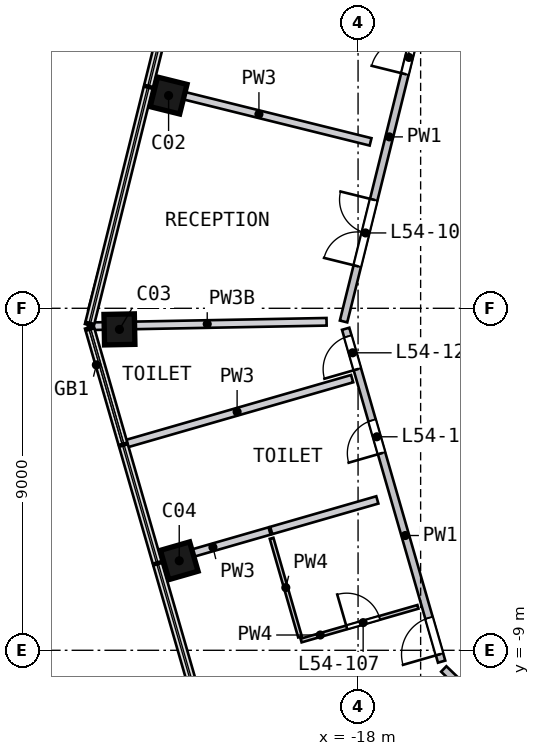
"""IFC4 building model, lengths in metres.
Left out: names, types, materials, properties, quantities, classifications, styles, units other than length and angle.
Written with IfcOpenShell. Run it as: python <this file> out.ifc"""

import sys

from ifc_helpers import new_model, si_unit, direction, frame, frame_2d, origin, origin_2d, place, context, subcontext, project, spatial, rectangle, extrude, element, fill, save


model = new_model("IFC4")
c1 = context("Model", 3, precision=1e-05, world=origin(), true_north=direction((0.0, 1.0)))
c2 = subcontext(c1, "Body", "Model", "MODEL_VIEW")
j1 = project(units=[si_unit("LENGTHUNIT", "METRE"), si_unit("PLANEANGLEUNIT", "RADIAN")], contexts=[c1])
p1 = place(None, origin())
s1 = spatial("IfcSite", under=j1, at=p1, CompositionType="ELEMENT")
p2 = place(p1, origin())
s2 = spatial("IfcBuilding", under=s1, at=p2, CompositionType="ELEMENT")
p3 = place(p2, frame((0.0, 0.0, 222.0)))
s3 = spatial("IfcBuildingStorey", under=s2, at=p3, CompositionType="ELEMENT", Elevation=222.0)
p4 = place(p3, frame((-22.963, 5.691, 0.0), z_axis=(-0.018422156, -0.07685412, 0.996872142), x_axis=(-0.240534622, -0.96741801, -0.079028416)))
e1 = element("IfcColumn", 1, at=p4, inside=s3, PredefinedType="COLUMN", context=c2, shape_type="SweptSolid", body=[
    extrude(rectangle(XDim=0.8, YDim=0.8, at=origin_2d()), origin(), (0.0, 0.0, 1.0), 4.705),
])
p5 = place(p3, frame((-24.281, -0.458, 0.0), z_axis=(0.002231039, -0.081095683, 0.996703824), x_axis=(-0.019006948, 0.996522811, 0.081123501)))
e2 = element("IfcColumn", 2, at=p5, inside=s3, PredefinedType="COLUMN", context=c2, shape_type="SweptSolid", body=[
    extrude(rectangle(XDim=0.8, YDim=0.8, at=origin_2d()), origin(), (0.0, 0.0, 1.0), 4.706),
])
p6 = place(p3, frame((-22.733, -6.553, 0.0), z_axis=(0.022521805, -0.075712705, 0.996875295), x_axis=(0.276161296, -0.957859976, -0.078988637)))
e3 = element("IfcColumn", 3, at=p6, inside=s3, PredefinedType="COLUMN", context=c2, shape_type="SweptSolid", body=[
    extrude(rectangle(XDim=0.8, YDim=0.8, at=origin_2d()), origin(), (0.0, 0.0, 1.0), 4.705),
])
p7 = place(p3, frame((-18.382, -0.346, 0.0), z_axis=(0.0, 0.0, 1.0), x_axis=(0.240585413, 0.970627971, 0.0)))
e4 = element("IfcWall", 4, at=p7, inside=s3, PredefinedType="SOLIDWALL", context=c2, shape_type="SweptSolid", body=[
    extrude(rectangle(XDim=9.517, YDim=0.2, at=frame_2d((4.758, 0.0))), origin(), (0.0, 0.0, 1.0), 4.69),
])
p8 = place(p7, frame((6.708, 0.0, 0.0)))
e5 = element("IfcOpeningElement", 5, at=p8, cuts=e4, PredefinedType="OPENING", context=c2, shape_type="SweptSolid", body=[
    extrude(rectangle(XDim=0.9, YDim=2.1, at=frame_2d((0.45, 1.05))), frame((0.0, 0.11, 0.0), z_axis=(0.0, -1.0, 0.0), x_axis=(1.0, 0.0, 0.0)), (0.0, 0.0, 1.0), 0.22),
])
p9 = place(p7, frame((1.5, 0.0, 0.0)))
e6 = element("IfcOpeningElement", 6, at=p9, cuts=e4, PredefinedType="OPENING", context=c2, shape_type="SweptSolid", body=[
    extrude(rectangle(XDim=1.8, YDim=2.1, at=frame_2d((0.9, 1.05))), frame((0.0, 0.11, 0.0), z_axis=(0.0, -1.0, 0.0), x_axis=(1.0, 0.0, 0.0)), (0.0, 0.0, 1.0), 0.22),
])
p10 = place(p3, frame((-15.801, -9.298, 0.0), z_axis=(0.0, 0.0, 1.0), x_axis=(-0.277001842, 0.960869387, 0.0)))
e7 = element("IfcWall", 7, at=p10, inside=s3, PredefinedType="SOLIDWALL", context=c2, shape_type="SweptSolid", body=[
    extrude(rectangle(XDim=9.116, YDim=0.2, at=frame_2d((4.558, 0.0))), origin(), (0.0, 0.0, 1.0), 4.69),
])
p11 = place(p10, frame((0.2, 0.0, 0.0)))
e8 = element("IfcOpeningElement", 8, at=p11, cuts=e7, PredefinedType="OPENING", context=c2, shape_type="SweptSolid", body=[
    extrude(rectangle(XDim=1.0, YDim=2.1, at=frame_2d((0.5, 1.05))), frame((0.0, 0.11, 0.0), z_axis=(0.0, -1.0, 0.0), x_axis=(1.0, 0.0, 0.0)), (0.0, 0.0, 1.0), 0.22),
])
p12 = place(p10, frame((8.008, 0.0, 0.0)))
e9 = element("IfcOpeningElement", 9, at=p12, cuts=e7, PredefinedType="OPENING", context=c2, shape_type="SweptSolid", body=[
    extrude(rectangle(XDim=0.9, YDim=2.1, at=frame_2d((0.45, 1.05))), frame((0.0, 0.11, 0.0), z_axis=(0.0, -1.0, 0.0), x_axis=(1.0, 0.0, 0.0)), (0.0, 0.0, 1.0), 0.22),
])
p13 = place(p10, frame((5.708, 0.0, 0.0)))
e10 = element("IfcOpeningElement", 10, at=p13, cuts=e7, PredefinedType="OPENING", context=c2, shape_type="SweptSolid", body=[
    extrude(rectangle(XDim=0.9, YDim=2.1, at=frame_2d((0.45, 1.05))), frame((0.0, 0.11, 0.0), z_axis=(0.0, -1.0, 0.0), x_axis=(1.0, 0.0, 0.0)), (0.0, 0.0, 1.0), 0.22),
])
p14 = place(p3, frame((-15.745, -9.491, 0.0), z_axis=(0.0, 0.0, 1.0), x_axis=(0.720309294, -0.693653027, 0.0)))
e11 = element("IfcWall", 11, at=p14, inside=s3, PredefinedType="SOLIDWALL", context=c2, shape_type="SweptSolid", body=[
    extrude(rectangle(XDim=9.516, YDim=0.2, at=frame_2d((4.758, 0.0))), origin(), (0.0, 0.0, 1.0), 4.69),
])
p15 = place(p3, frame((-19.527, -8.647, 0.0), z_axis=(0.0, 0.0, 1.0), x_axis=(-0.276953567, 0.960883303, 0.0)))
e12 = element("IfcWall", 12, at=p15, inside=s3, PredefinedType="PARTITIONING", context=c2, shape_type="SweptSolid", body=[
    extrude(rectangle(XDim=2.7, YDim=0.1, at=frame_2d((1.35, 0.0))), origin(), (0.0, 0.0, 1.0), 4.69),
])
p16 = place(p3, frame((-19.5, -8.743, 0.0), z_axis=(0.0, 0.0, 1.0), x_axis=(0.960882179, 0.276957465, 0.0)))
e13 = element("IfcWall", 13, at=p16, inside=s3, PredefinedType="PARTITIONING", context=c2, shape_type="SweptSolid", body=[
    extrude(rectangle(XDim=3.2, YDim=0.1, at=frame_2d((1.6, 0.0))), origin(), (0.0, 0.0, 1.0), 4.69),
])
p17 = place(p16, frame((1.25, 0.0, 0.0)))
e14 = element("IfcOpeningElement", 14, at=p17, cuts=e13, PredefinedType="OPENING", context=c2, shape_type="SweptSolid", body=[
    extrude(rectangle(XDim=0.9, YDim=2.1, at=frame_2d((0.45, 1.05))), frame((0.0, 0.06, 0.0), z_axis=(0.0, -1.0, 0.0), x_axis=(1.0, 0.0, 0.0)), (0.0, 0.0, 1.0), 0.12),
])
p18 = place(p3, frame((-18.829, -0.355, 0.0), z_axis=(0.0, 0.0, 1.0), x_axis=(-0.999822352, -0.018848441, 0.0)))
e15 = element("IfcWall", 15, at=p18, inside=s3, PredefinedType="SOLIDWALL", context=c2, shape_type="SweptSolid", body=[
    extrude(rectangle(XDim=6.282, YDim=0.2, at=frame_2d((3.141, 0.0))), origin(), (0.0, 0.0, 1.0), 4.19),
])
p19 = place(p3, frame((-20.329, -5.86, 0.0), z_axis=(0.0, 0.0, 1.0), x_axis=(-0.960876781, -0.276976195, 0.0)))
e16 = element("IfcWall", 16, at=p19, inside=s3, PredefinedType="SOLIDWALL", context=c2, shape_type="SweptSolid", body=[
    extrude(rectangle(XDim=3.102, YDim=0.2, at=frame_2d((1.551, 0.0))), origin(), (0.0, 0.0, 1.0), 4.69),
])
p20 = place(p3, frame((-18.156, -1.851, 0.0), z_axis=(0.0, 0.0, 1.0), x_axis=(-0.960879339, -0.276967318, 0.0)))
e17 = element("IfcWall", 17, at=p20, inside=s3, PredefinedType="SOLIDWALL", context=c2, shape_type="SweptSolid", body=[
    extrude(rectangle(XDim=6.3, YDim=0.2, at=frame_2d((3.15, 0.0))), origin(), (0.0, 0.0, 1.0), 4.69),
])
p21 = place(p3, frame((-17.671, 4.38, 0.0), z_axis=(0.0, 0.0, 1.0), x_axis=(-0.970634009, 0.240561055, 0.0)))
e18 = element("IfcWall", 18, at=p21, inside=s3, PredefinedType="SOLIDWALL", context=c2, shape_type="SweptSolid", body=[
    extrude(rectangle(XDim=6.053, YDim=0.2, at=frame_2d((3.026, 0.0))), origin(), (0.0, 0.0, 1.0), 4.69),
])
p22 = place(p3, frame((-17.493, -5.042, 0.0), z_axis=(0.0, 0.0, 1.0), x_axis=(-0.960861461, -0.277029336, 0.0)))
e19 = element("IfcWall", 19, at=p22, inside=s3, PredefinedType="SOLIDWALL", context=c2, shape_type="SweptSolid", body=[
    extrude(rectangle(XDim=2.905, YDim=0.2, at=frame_2d((1.452, 0.0))), origin(), (0.0, 0.0, 1.0), 4.69),
])
p23 = place(p8, origin())
e20 = element("IfcDoor", 20, at=p23, inside=s3, OperationType="SINGLE_SWING_LEFT", PredefinedType="DOOR", context=c2, shape_type="SweptSolid", body=[
    extrude(rectangle(XDim=0.9, YDim=2.1, at=frame_2d((0.45, 1.05))), frame((0.0, 0.025, 0.0), z_axis=(0.0, -1.0, 0.0), x_axis=(1.0, 0.0, 0.0)), (0.0, 0.0, 1.0), 0.05),
])
fill(e5, e20)
p24 = place(p9, origin())
e21 = element("IfcDoor", 21, at=p24, inside=s3, OperationType="DOUBLE_DOOR_SINGLE_SWING", PredefinedType="DOOR", context=c2, shape_type="SweptSolid", body=[
    extrude(rectangle(XDim=1.8, YDim=2.1, at=frame_2d((0.9, 1.05))), frame((0.0, 0.025, 0.0), z_axis=(0.0, -1.0, 0.0), x_axis=(1.0, 0.0, 0.0)), (0.0, 0.0, 1.0), 0.05),
])
fill(e6, e21)
p25 = place(p11, origin())
e22 = element("IfcDoor", 22, at=p25, inside=s3, OperationType="SINGLE_SWING_LEFT", PredefinedType="DOOR", context=c2, shape_type="SweptSolid", body=[
    extrude(rectangle(XDim=1.0, YDim=2.1, at=frame_2d((0.5, 1.05))), frame((0.0, 0.025, 0.0), z_axis=(0.0, -1.0, 0.0), x_axis=(1.0, 0.0, 0.0)), (0.0, 0.0, 1.0), 0.05),
])
fill(e8, e22)
p26 = place(p17, origin())
e23 = element("IfcDoor", 23, at=p26, inside=s3, OperationType="SINGLE_SWING_LEFT", PredefinedType="DOOR", context=c2, shape_type="SweptSolid", body=[
    extrude(rectangle(XDim=0.9, YDim=2.1, at=frame_2d((0.45, 1.05))), frame((0.0, 0.025, 0.0), z_axis=(0.0, -1.0, 0.0), x_axis=(1.0, 0.0, 0.0)), (0.0, 0.0, 1.0), 0.05),
])
fill(e14, e23)
p27 = place(p12, origin())
e24 = element("IfcDoor", 24, at=p27, inside=s3, OperationType="SINGLE_SWING_LEFT", PredefinedType="DOOR", context=c2, shape_type="SweptSolid", body=[
    extrude(rectangle(XDim=0.9, YDim=2.1, at=frame_2d((0.45, 1.05))), frame((0.0, 0.025, 0.0), z_axis=(0.0, -1.0, 0.0), x_axis=(1.0, 0.0, 0.0)), (0.0, 0.0, 1.0), 0.05),
])
fill(e9, e24)
p28 = place(p13, origin())
e25 = element("IfcDoor", 25, at=p28, inside=s3, OperationType="SINGLE_SWING_LEFT", PredefinedType="DOOR", context=c2, shape_type="SweptSolid", body=[
    extrude(rectangle(XDim=0.9, YDim=2.1, at=frame_2d((0.45, 1.05))), frame((0.0, 0.025, 0.0), z_axis=(0.0, -1.0, 0.0), x_axis=(1.0, 0.0, 0.0)), (0.0, 0.0, 1.0), 0.05),
])
fill(e10, e25)
save(model, sys.argv[1])
